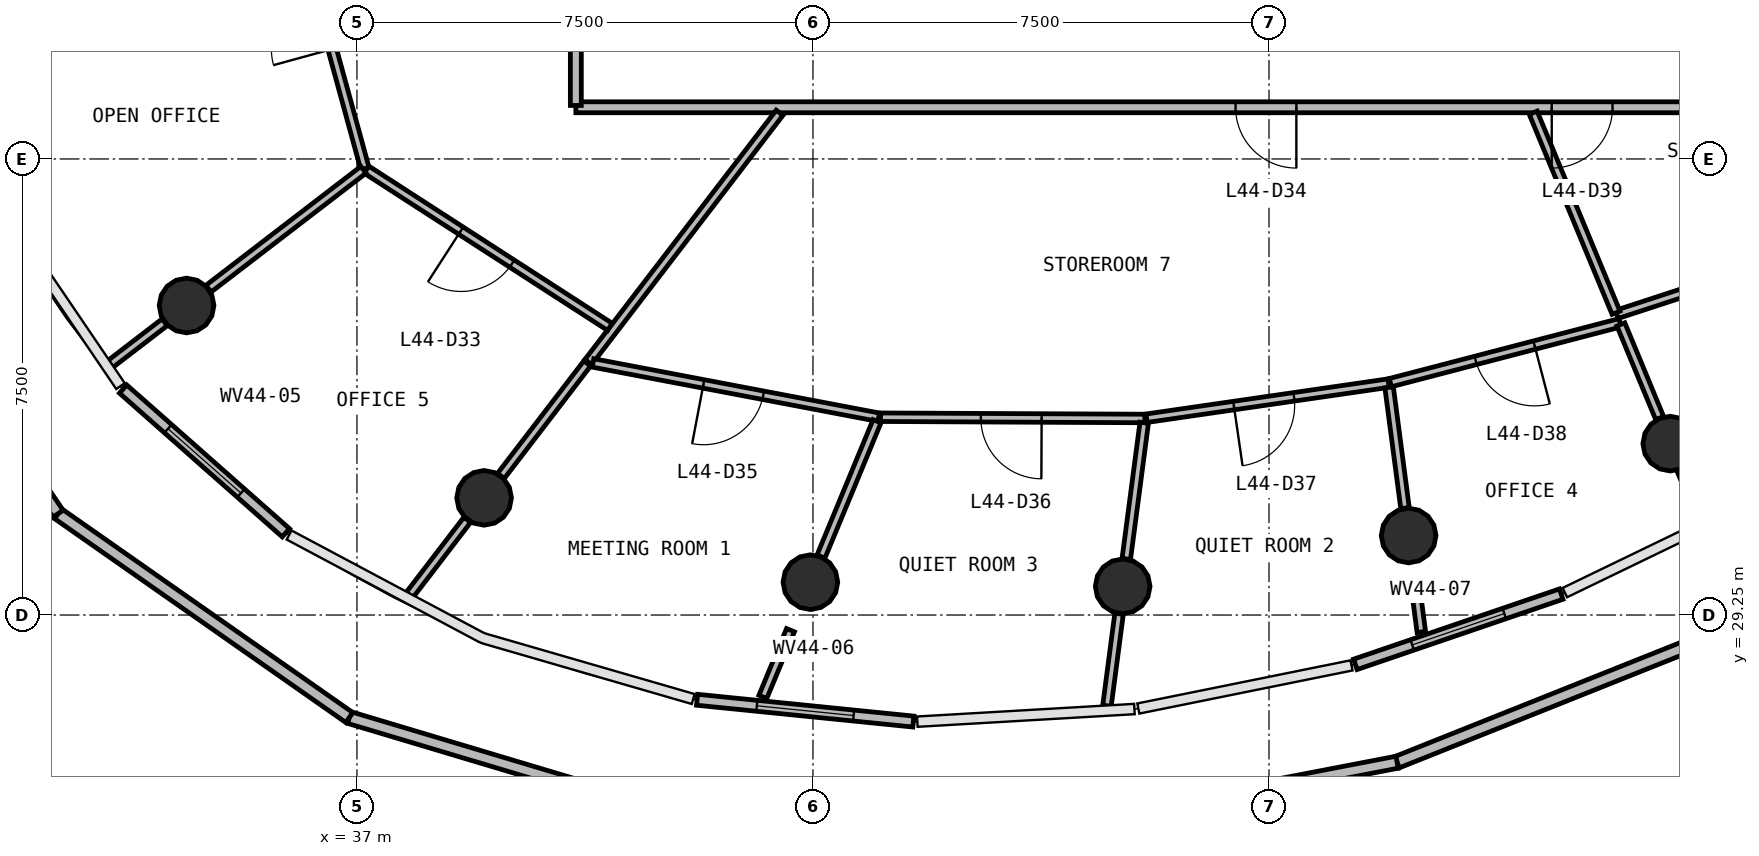
"""IFC4 building model, lengths in metres.
Left out: names, types, materials, properties, quantities, classifications, styles, units other than length and angle.
Written with IfcOpenShell. Run it as: python <this file> out.ifc"""

import sys

from ifc_helpers import new_model, si_unit, direction, frame, frame_2d, origin, origin_2d, place, context, subcontext, project, spatial, rectangle, circle, extrude, source, transform, mapped, element, fill, save


model = new_model("IFC4")
c1 = context("Model", 3, precision=1e-05, world=origin(), true_north=direction((0.0, 1.0)))
c2 = subcontext(c1, "Body", "Model", "MODEL_VIEW")
j1 = project(units=[si_unit("LENGTHUNIT", "METRE"), si_unit("PLANEANGLEUNIT", "RADIAN")], contexts=[c1])
p1 = place(None, origin())
s1 = spatial("IfcSite", under=j1, at=p1, CompositionType="ELEMENT")
p2 = place(p1, origin())
s2 = spatial("IfcBuilding", under=s1, at=p2, CompositionType="ELEMENT")
p3 = place(p2, frame((0.0, 0.0, 183.8)))
s3 = spatial("IfcBuildingStorey", under=s2, at=p3, CompositionType="ELEMENT", Elevation=183.8)
m1 = source(origin(), c2, "Body", "SweptSolid", [
    extrude(circle(Radius=0.45, at=origin_2d()), origin(), (0.0, 0.0, 1.0), 4.22),
])
for number, where, z_axis, x_axis in (
    (1, (34.198, 34.34, -0.32), (0.0, 0.0, 1.0), (1.0, 0.0, 0.0)),
    (2, (39.091, 31.177, -0.32), (0.0, 0.0, 1.0), (1.0, 0.0, 0.0)),
    (3, (44.457, 29.79, -0.32), (0.0, 0.0, 1.0), (1.0, 0.0, 0.0)),
    (4, (49.594, 29.722, -0.32), (0.0, 0.0, 1.0), (1.0, 0.0, 0.0)),
    (5, (54.296, 30.558, -0.32), (0.0, 0.0, 1.0), (1.0, 0.0, 0.0)),
    (6, (58.599, 32.069, -0.32), (0.0, 0.0, 1.0), (1.0, 0.0, 0.0)),
):
    element("IfcColumn", number, at=place(p3, frame(where, z_axis=z_axis, x_axis=x_axis)), inside=s3, PredefinedType="COLUMN", context=c2, shape_type="MappedRepresentation", body=[
        mapped(m1, transform((0.0, 0.0, 0.0), scale=1.0)),
    ])
p4 = place(p3, frame((33.154, 32.966, 0.0), z_axis=(0.0, 0.0, 1.0), x_axis=(0.749604367719, -0.661886162339, 0.0)))
e7 = element("IfcWall", 7, at=p4, inside=s3, PredefinedType="STANDARD", context=c2, shape_type="SweptSolid", body=[
    extrude(rectangle(XDim=3.571, YDim=0.18, at=frame_2d((1.785, 0.0))), origin(), (0.0, 0.0, 1.0), 3.58),
])
p5 = place(p4, frame((0.985, 0.0, 0.9)))
e8 = element("IfcOpeningElement", 8, at=p5, cuts=e7, PredefinedType="OPENING", context=c2, shape_type="SweptSolid", body=[
    extrude(rectangle(XDim=1.6, YDim=2.0, at=frame_2d((0.8, 1.0))), frame((0.0, 0.1, 0.0), z_axis=(0.0, -1.0, 0.0), x_axis=(1.0, 0.0, 0.0)), (0.0, 0.0, 1.0), 0.2),
])
p6 = place(p3, frame((42.594, 27.856, 0.0), z_axis=(0.0, 0.0, 1.0), x_axis=(0.994957099306, -0.100301398496, 0.0)))
e9 = element("IfcWall", 9, at=p6, inside=s3, PredefinedType="STANDARD", context=c2, shape_type="SweptSolid", body=[
    extrude(rectangle(XDim=3.576, YDim=0.18, at=frame_2d((1.788, 0.0))), origin(), (0.0, 0.0, 1.0), 3.58),
])
p7 = place(p6, frame((0.988, 0.0, 0.9)))
e10 = element("IfcOpeningElement", 10, at=p7, cuts=e9, PredefinedType="OPENING", context=c2, shape_type="SweptSolid", body=[
    extrude(rectangle(XDim=1.6, YDim=2.0, at=frame_2d((0.8, 1.0))), frame((0.0, 0.1, 0.0), z_axis=(0.0, -1.0, 0.0), x_axis=(1.0, 0.0, 0.0)), (0.0, 0.0, 1.0), 0.2),
])
p8 = place(p3, frame((53.42, 28.439, 0.0), z_axis=(0.0, 0.0, 1.0), x_axis=(0.946413978014, 0.322956006632, 0.0)))
e11 = element("IfcWall", 11, at=p8, inside=s3, PredefinedType="STANDARD", context=c2, shape_type="SweptSolid", body=[
    extrude(rectangle(XDim=3.577, YDim=0.18, at=frame_2d((1.789, 0.0))), origin(), (0.0, 0.0, 1.0), 3.58),
])
p9 = place(p8, frame((0.989, 0.0, 0.9)))
e12 = element("IfcOpeningElement", 12, at=p9, cuts=e11, PredefinedType="OPENING", context=c2, shape_type="SweptSolid", body=[
    extrude(rectangle(XDim=1.6, YDim=2.0, at=frame_2d((0.8, 1.0))), frame((0.0, 0.1, 0.0), z_axis=(0.0, -1.0, 0.0), x_axis=(1.0, 0.0, 0.0)), (0.0, 0.0, 1.0), 0.2),
])
p10 = place(p3, frame((59.556, 29.005, 0.0), z_axis=(0.0, 0.0, 1.0), x_axis=(-0.928728959039, -0.370759383755, 0.0)))
e13 = element("IfcWall", 13, at=p10, inside=s3, PredefinedType="PARAPET", context=c2, shape_type="SweptSolid", body=[
    extrude(rectangle(XDim=5.868, YDim=0.2, at=frame_2d((2.934, 0.0))), origin(), (0.0, 0.0, 1.0), 1.1),
])
p11 = place(p3, frame((54.106, 26.829, 0.0), z_axis=(0.0, 0.0, 1.0), x_axis=(-0.981997837931, -0.188892155205, 0.0)))
e14 = element("IfcWall", 14, at=p11, inside=s3, PredefinedType="PARAPET", context=c2, shape_type="SweptSolid", body=[
    extrude(rectangle(XDim=5.867, YDim=0.2, at=frame_2d((2.933, 0.0))), origin(), (0.0, 0.0, 1.0), 1.1),
])
p12 = place(p3, frame((42.485, 25.886, 0.0), z_axis=(0.0, 0.0, 1.0), x_axis=(-0.958052046342, 0.286594271576, 0.0)))
e15 = element("IfcWall", 15, at=p12, inside=s3, PredefinedType="PARAPET", context=c2, shape_type="SweptSolid", body=[
    extrude(rectangle(XDim=5.856, YDim=0.2, at=frame_2d((2.928, 0.0))), origin(), (0.0, 0.0, 1.0), 1.1),
])
p13 = place(p3, frame((36.875, 27.564, 0.0), z_axis=(0.0, 0.0, 1.0), x_axis=(-0.819257423142, 0.573425910321, 0.0)))
e16 = element("IfcWall", 16, at=p13, inside=s3, PredefinedType="PARAPET", context=c2, shape_type="SweptSolid", body=[
    extrude(rectangle(XDim=5.846, YDim=0.2, at=frame_2d((2.923, 0.0))), origin(), (0.0, 0.0, 1.0), 1.1),
])
p14 = place(p3, frame((32.085, 30.917, 0.0), z_axis=(0.0, 0.0, 1.0), x_axis=(-0.559388155202, 0.828905840141, 0.0)))
e17 = element("IfcWall", 17, at=p14, inside=s3, PredefinedType="PARAPET", context=c2, shape_type="SweptSolid", body=[
    extrude(rectangle(XDim=5.842, YDim=0.2, at=frame_2d((2.921, 0.0))), origin(), (0.0, 0.0, 1.0), 1.1),
])
p15 = place(p3, frame((63.4, 37.6, 0.0), z_axis=(0.0, 0.0, 1.0), x_axis=(-1.0, 0.0, 0.0)))
e18 = element("IfcWall", 18, at=p15, inside=s3, PredefinedType="PARTITIONING", context=c2, shape_type="SweptSolid", body=[
    extrude(rectangle(XDim=22.8, YDim=0.18, at=frame_2d((11.4, 0.0))), origin(), (0.0, 0.0, 1.0), 2.88),
])
p16 = place(p15, frame((10.95, 0.0, 0.0)))
e19 = element("IfcOpeningElement", 19, at=p16, cuts=e18, PredefinedType="OPENING", context=c2, shape_type="SweptSolid", body=[
    extrude(rectangle(XDim=1.0, YDim=2.1, at=frame_2d((0.5, 1.05))), frame((0.0, 0.1, 0.0), z_axis=(0.0, -1.0, 0.0), x_axis=(1.0, 0.0, 0.0)), (0.0, 0.0, 1.0), 0.2),
])
p17 = place(p15, frame((5.75, 0.0, 0.0)))
e20 = element("IfcOpeningElement", 20, at=p17, cuts=e18, PredefinedType="OPENING", context=c2, shape_type="SweptSolid", body=[
    extrude(rectangle(XDim=1.0, YDim=2.1, at=frame_2d((0.5, 1.05))), frame((0.0, 0.1, 0.0), z_axis=(0.0, -1.0, 0.0), x_axis=(1.0, 0.0, 0.0)), (0.0, 0.0, 1.0), 0.2),
])
p18 = place(p3, frame((40.6, 37.63, 0.0), z_axis=(0.0, 0.0, 1.0), x_axis=(0.0, 1.0, 0.0)))
e21 = element("IfcWall", 21, at=p18, inside=s3, PredefinedType="PARTITIONING", context=c2, shape_type="SweptSolid", body=[
    extrude(rectangle(XDim=20.74, YDim=0.18, at=frame_2d((10.37, 0.0))), origin(), (0.0, 0.0, 1.0), 2.88),
])
p19 = place(p18, frame((12.09, 0.0, 0.0)))
e22 = element("IfcOpeningElement", 22, at=p19, cuts=e21, PredefinedType="OPENING", context=c2, shape_type="SweptSolid", body=[
    extrude(rectangle(XDim=1.0, YDim=2.1, at=frame_2d((0.5, 1.05))), frame((0.0, 0.1, 0.0), z_axis=(0.0, -1.0, 0.0), x_axis=(1.0, 0.0, 0.0)), (0.0, 0.0, 1.0), 0.2),
])
p20 = place(p18, frame((9.89, 0.0, 0.0)))
e23 = element("IfcOpeningElement", 23, at=p20, cuts=e21, PredefinedType="OPENING", context=c2, shape_type="SweptSolid", body=[
    extrude(rectangle(XDim=1.0, YDim=2.1, at=frame_2d((0.5, 1.05))), frame((0.0, 0.1, 0.0), z_axis=(0.0, -1.0, 0.0), x_axis=(1.0, 0.0, 0.0)), (0.0, 0.0, 1.0), 0.2),
])
p21 = place(p3, frame((43.951, 37.51, 0.0), z_axis=(0.0, 0.0, 1.0), x_axis=(-0.608755854273, -0.793357617905, 0.0)))
e24 = element("IfcWall", 24, at=p21, inside=s3, PredefinedType="PARTITIONING", context=c2, shape_type="SweptSolid", body=[
    extrude(rectangle(XDim=5.167, YDim=0.14, at=frame_2d((2.583, 0.0))), origin(), (0.0, 0.0, 1.0), 2.88),
])
p22 = place(p3, frame((37.131, 36.591, 0.0), z_axis=(0.0, 0.0, 1.0), x_axis=(-0.264211604104, 0.964464736658, 0.0)))
e25 = element("IfcWall", 25, at=p22, inside=s3, PredefinedType="PARTITIONING", context=c2, shape_type="SweptSolid", body=[
    extrude(rectangle(XDim=4.889, YDim=0.14, at=frame_2d((2.445, 0.0))), origin(), (0.0, 0.0, 1.0), 2.88),
])
p23 = place(p22, frame((2.039, 0.0, 0.0)))
e26 = element("IfcOpeningElement", 26, at=p23, cuts=e25, PredefinedType="OPENING", context=c2, shape_type="SweptSolid", body=[
    extrude(rectangle(XDim=1.0, YDim=2.1, at=frame_2d((0.5, 1.05))), frame((0.0, 0.08, 0.0), z_axis=(0.0, -1.0, 0.0), x_axis=(1.0, 0.0, 0.0)), (0.0, 0.0, 1.0), 0.16),
])
p24 = place(p3, frame((41.16, 33.989, 0.0), z_axis=(0.0, 0.0, 1.0), x_axis=(-0.840031596416, 0.542537479832, 0.0)))
e27 = element("IfcWall", 27, at=p24, inside=s3, PredefinedType="PARTITIONING", context=c2, shape_type="SweptSolid", body=[
    extrude(rectangle(XDim=4.766, YDim=0.14, at=frame_2d((2.383, 0.0))), origin(), (0.0, 0.0, 1.0), 2.88),
])
p25 = place(p24, frame((1.917, 0.0, 0.0)))
e28 = element("IfcOpeningElement", 28, at=p25, cuts=e27, PredefinedType="OPENING", context=c2, shape_type="SweptSolid", body=[
    extrude(rectangle(XDim=1.0, YDim=2.1, at=frame_2d((0.5, 1.05))), frame((0.0, 0.08, 0.0), z_axis=(0.0, -1.0, 0.0), x_axis=(1.0, 0.0, 0.0)), (0.0, 0.0, 1.0), 0.16),
])
p26 = place(p3, frame((45.581, 32.503, 0.0), z_axis=(0.0, 0.0, 1.0), x_axis=(-0.982412655338, 0.186722721253, 0.0)))
e29 = element("IfcWall", 29, at=p26, inside=s3, PredefinedType="PARTITIONING", context=c2, shape_type="SweptSolid", body=[
    extrude(rectangle(XDim=4.783, YDim=0.14, at=frame_2d((2.392, 0.0))), origin(), (0.0, 0.0, 1.0), 2.88),
])
p27 = place(p26, frame((1.933, 0.0, 0.0)))
e30 = element("IfcOpeningElement", 30, at=p27, cuts=e29, PredefinedType="OPENING", context=c2, shape_type="SweptSolid", body=[
    extrude(rectangle(XDim=1.0, YDim=2.1, at=frame_2d((0.5, 1.05))), frame((0.0, 0.08, 0.0), z_axis=(0.0, -1.0, 0.0), x_axis=(1.0, 0.0, 0.0)), (0.0, 0.0, 1.0), 0.16),
])
p28 = place(p3, frame((49.957, 32.482, 0.0), z_axis=(0.0, 0.0, 1.0), x_axis=(-0.99998886773, 0.004718518419, 0.0)))
e31 = element("IfcWall", 31, at=p28, inside=s3, PredefinedType="PARTITIONING", context=c2, shape_type="SweptSolid", body=[
    extrude(rectangle(XDim=4.346, YDim=0.14, at=frame_2d((2.173, 0.0))), origin(), (0.0, 0.0, 1.0), 2.88),
])
p29 = place(p28, frame((1.696, 0.0, 0.0)))
e32 = element("IfcOpeningElement", 32, at=p29, cuts=e31, PredefinedType="OPENING", context=c2, shape_type="SweptSolid", body=[
    extrude(rectangle(XDim=1.0, YDim=2.1, at=frame_2d((0.5, 1.05))), frame((0.0, 0.08, 0.0), z_axis=(0.0, -1.0, 0.0), x_axis=(1.0, 0.0, 0.0)), (0.0, 0.0, 1.0), 0.16),
])
p30 = place(p3, frame((61.589, 35.457, 0.0), z_axis=(0.0, 0.0, 1.0), x_axis=(-0.950567170275, -0.310519008749, 0.0)))
e33 = element("IfcWall", 33, at=p30, inside=s3, PredefinedType="PARTITIONING", context=c2, shape_type="SweptSolid", body=[
    extrude(rectangle(XDim=4.071, YDim=0.14, at=frame_2d((2.036, 0.0))), origin(), (0.0, 0.0, 1.0), 2.88),
])
p31 = place(p30, frame((1.621, 0.0, 0.0)))
e34 = element("IfcOpeningElement", 34, at=p31, cuts=e33, PredefinedType="OPENING", context=c2, shape_type="SweptSolid", body=[
    extrude(rectangle(XDim=1.0, YDim=2.1, at=frame_2d((0.5, 1.05))), frame((0.0, 0.08, 0.0), z_axis=(0.0, -1.0, 0.0), x_axis=(1.0, 0.0, 0.0)), (0.0, 0.0, 1.0), 0.16),
])
p32 = place(p3, frame((53.966, 33.064, 0.0), z_axis=(0.0, 0.0, 1.0), x_axis=(-0.989628850434, -0.143647966879, 0.0)))
e35 = element("IfcWall", 35, at=p32, inside=s3, PredefinedType="PARTITIONING", context=c2, shape_type="SweptSolid", body=[
    extrude(rectangle(XDim=4.021, YDim=0.14, at=frame_2d((2.011, 0.0))), origin(), (0.0, 0.0, 1.0), 2.88),
])
p33 = place(p32, frame((1.571, 0.0, 0.0)))
e36 = element("IfcOpeningElement", 36, at=p33, cuts=e35, PredefinedType="OPENING", context=c2, shape_type="SweptSolid", body=[
    extrude(rectangle(XDim=1.0, YDim=2.1, at=frame_2d((0.5, 1.05))), frame((0.0, 0.08, 0.0), z_axis=(0.0, -1.0, 0.0), x_axis=(1.0, 0.0, 0.0)), (0.0, 0.0, 1.0), 0.16),
])
p34 = place(p3, frame((57.775, 34.057, 0.0), z_axis=(0.0, 0.0, 1.0), x_axis=(-0.96764845844, -0.252302320398, 0.0)))
e37 = element("IfcWall", 37, at=p34, inside=s3, PredefinedType="PARTITIONING", context=c2, shape_type="SweptSolid", body=[
    extrude(rectangle(XDim=3.906, YDim=0.14, at=frame_2d((1.953, 0.0))), origin(), (0.0, 0.0, 1.0), 2.88),
])
p35 = place(p34, frame((1.456, 0.0, 0.0)))
e38 = element("IfcOpeningElement", 38, at=p35, cuts=e37, PredefinedType="OPENING", context=c2, shape_type="SweptSolid", body=[
    extrude(rectangle(XDim=1.0, YDim=2.1, at=frame_2d((0.5, 1.05))), frame((0.0, 0.08, 0.0), z_axis=(0.0, -1.0, 0.0), x_axis=(1.0, 0.0, 0.0)), (0.0, 0.0, 1.0), 0.16),
])
p36 = place(p3, frame((56.345, 37.51, 0.0), z_axis=(0.0, 0.0, 1.0), x_axis=(0.382666743194, -0.923886445216, 0.0)))
e39 = element("IfcWall", 39, at=p36, inside=s3, PredefinedType="PARTITIONING", context=c2, shape_type="SweptSolid", body=[
    extrude(rectangle(XDim=3.56, YDim=0.14, at=frame_2d((1.78, 0.0))), origin(), (0.0, 0.0, 1.0), 2.88),
])
p37 = place(p3, frame((37.107, 36.573, 0.0), z_axis=(0.0, 0.0, 1.0), x_axis=(-0.79334944096, -0.608766510683, 0.0)))
e40 = element("IfcWall", 40, at=p37, inside=s3, PredefinedType="PARTITIONING", context=c2, shape_type="SweptSolid", body=[
    extrude(rectangle(XDim=3.213, YDim=0.14, at=frame_2d((1.606, 0.0))), origin(), (0.0, 0.0, 1.0), 2.88),
])
p38 = place(p3, frame((40.787, 33.387, 0.0), z_axis=(0.0, 0.0, 1.0), x_axis=(-0.608778925589, -0.793339914386, 0.0)))
e41 = element("IfcWall", 41, at=p38, inside=s3, PredefinedType="PARTITIONING", context=c2, shape_type="SweptSolid", body=[
    extrude(rectangle(XDim=2.331, YDim=0.14, at=frame_2d((1.166, 0.0))), origin(), (0.0, 0.0, 1.0), 2.88),
])
p39 = place(p3, frame((45.553, 32.437, 0.0), z_axis=(0.0, 0.0, 1.0), x_axis=(-0.38266497151, -0.923887179032, 0.0)))
e42 = element("IfcWall", 42, at=p39, inside=s3, PredefinedType="PARTITIONING", context=c2, shape_type="SweptSolid", body=[
    extrude(rectangle(XDim=2.41, YDim=0.14, at=frame_2d((1.205, 0.0))), origin(), (0.0, 0.0, 1.0), 2.88),
])
p40 = place(p3, frame((49.948, 32.412, 0.0), z_axis=(0.0, 0.0, 1.0), x_axis=(-0.130549561333, -0.991441784492, 0.0)))
e43 = element("IfcWall", 43, at=p40, inside=s3, PredefinedType="PARTITIONING", context=c2, shape_type="SweptSolid", body=[
    extrude(rectangle(XDim=2.259, YDim=0.14, at=frame_2d((1.129, 0.0))), origin(), (0.0, 0.0, 1.0), 2.88),
])
p41 = place(p3, frame((53.976, 32.994, 0.0), z_axis=(0.0, 0.0, 1.0), x_axis=(0.13051125281, -0.99144682807, 0.0)))
e44 = element("IfcWall", 44, at=p41, inside=s3, PredefinedType="PARTITIONING", context=c2, shape_type="SweptSolid", body=[
    extrude(rectangle(XDim=2.003, YDim=0.14, at=frame_2d((1.002, 0.0))), origin(), (0.0, 0.0, 1.0), 2.88),
])
p42 = place(p3, frame((57.787, 34.029, 0.0), z_axis=(0.0, 0.0, 1.0), x_axis=(0.382649262881, -0.923893685235, 0.0)))
e45 = element("IfcWall", 45, at=p42, inside=s3, PredefinedType="PARTITIONING", context=c2, shape_type="SweptSolid", body=[
    extrude(rectangle(XDim=1.667, YDim=0.14, at=frame_2d((0.833, 0.0))), origin(), (0.0, 0.0, 1.0), 2.88),
])
p43 = place(p3, frame((44.13, 29.0, 0.0), z_axis=(0.0, 0.0, 1.0), x_axis=(-0.382715239219, -0.92386635704, 0.0)))
e46 = element("IfcWall", 46, at=p43, inside=s3, PredefinedType="PARTITIONING", context=c2, shape_type="SweptSolid", body=[
    extrude(rectangle(XDim=1.187, YDim=0.14, at=frame_2d((0.593, 0.0))), origin(), (0.0, 0.0, 1.0), 2.88),
])
p44 = place(p3, frame((37.838, 29.543, 0.0), z_axis=(0.0, 0.0, 1.0), x_axis=(0.608680693656, 0.79341528418, 0.0)))
e47 = element("IfcWall", 47, at=p44, inside=s3, PredefinedType="PARTITIONING", context=c2, shape_type="SweptSolid", body=[
    extrude(rectangle(XDim=1.604, YDim=0.14, at=frame_2d((0.802, 0.0))), origin(), (0.0, 0.0, 1.0), 2.88),
])
p45 = place(p3, frame((49.534, 29.271, 0.0), z_axis=(0.0, 0.0, 1.0), x_axis=(-0.130392432869, -0.991462461947, 0.0)))
e48 = element("IfcWall", 48, at=p45, inside=s3, PredefinedType="PARTITIONING", context=c2, shape_type="SweptSolid", body=[
    extrude(rectangle(XDim=1.526, YDim=0.14, at=frame_2d((0.763, 0.0))), origin(), (0.0, 0.0, 1.0), 2.88),
])
p46 = place(p3, frame((54.408, 29.71, 0.0), z_axis=(0.0, 0.0, 1.0), x_axis=(0.13027669696, -0.991477676112, 0.0)))
e49 = element("IfcWall", 49, at=p46, inside=s3, PredefinedType="PARTITIONING", context=c2, shape_type="SweptSolid", body=[
    extrude(rectangle(XDim=0.746, YDim=0.14, at=frame_2d((0.373, 0.0))), origin(), (0.0, 0.0, 1.0), 2.88),
])
p47 = place(p3, frame((33.837, 34.063, 0.0), z_axis=(0.0, 0.0, 1.0), x_axis=(-0.793460027174, -0.608622366725, 0.0)))
e50 = element("IfcWall", 50, at=p47, inside=s3, PredefinedType="PARTITIONING", context=c2, shape_type="SweptSolid", body=[
    extrude(rectangle(XDim=1.128, YDim=0.14, at=frame_2d((0.564, 0.0))), origin(), (0.0, 0.0, 1.0), 2.88),
])
p48 = place(p3, frame((58.773, 31.648, 0.0), z_axis=(0.0, 0.0, 1.0), x_axis=(0.382644588695, -0.92389562113, 0.0)))
e51 = element("IfcWall", 51, at=p48, inside=s3, PredefinedType="PARTITIONING", context=c2, shape_type="SweptSolid", body=[
    extrude(rectangle(XDim=0.933, YDim=0.14, at=frame_2d((0.466, 0.0))), origin(), (0.0, 0.0, 1.0), 2.88),
])
m2 = source(origin(), c2, "Body", "SweptSolid", [
    extrude(rectangle(XDim=1.6, YDim=2.0, at=frame_2d((0.8, 1.0))), frame((0.0, 0.03, 0.0), z_axis=(0.0, -1.0, 0.0), x_axis=(1.0, 0.0, 0.0)), (0.0, 0.0, 1.0), 0.06),
])
p49 = place(p5, origin())
e52 = element("IfcWindow", 52, at=p49, inside=s3, PartitioningType="SINGLE_PANEL", PredefinedType="WINDOW", context=c2, shape_type="MappedRepresentation", body=[
    mapped(m2, transform((0.0, 0.0, 0.0), scale=1.0)),
])
fill(e8, e52)
p50 = place(p7, origin())
e53 = element("IfcWindow", 53, at=p50, inside=s3, PartitioningType="SINGLE_PANEL", PredefinedType="WINDOW", context=c2, shape_type="MappedRepresentation", body=[
    mapped(m2, transform((0.0, 0.0, 0.0), scale=1.0)),
])
fill(e10, e53)
p51 = place(p9, origin())
e54 = element("IfcWindow", 54, at=p51, inside=s3, PartitioningType="SINGLE_PANEL", PredefinedType="WINDOW", context=c2, shape_type="MappedRepresentation", body=[
    mapped(m2, transform((0.0, 0.0, 0.0), scale=1.0)),
])
fill(e12, e54)
m3 = source(origin(), c2, "Body", "SweptSolid", [
    extrude(rectangle(XDim=1.0, YDim=2.1, at=frame_2d((0.5, 1.05))), frame((0.0, 0.025, 0.0), z_axis=(0.0, -1.0, 0.0), x_axis=(1.0, 0.0, 0.0)), (0.0, 0.0, 1.0), 0.05),
])
p52 = place(p25, origin())
e55 = element("IfcDoor", 55, at=p52, inside=s3, OperationType="SINGLE_SWING_RIGHT", PredefinedType="DOOR", context=c2, shape_type="MappedRepresentation", body=[
    mapped(m3, transform((0.0, 0.0, 0.0), scale=1.0)),
])
fill(e28, e55)
p53 = place(p16, origin())
e56 = element("IfcDoor", 56, at=p53, inside=s3, OperationType="SINGLE_SWING_LEFT", PredefinedType="DOOR", context=c2, shape_type="MappedRepresentation", body=[
    mapped(m3, transform((0.0, 0.0, 0.0), scale=1.0)),
])
fill(e19, e56)
p54 = place(p27, origin())
e57 = element("IfcDoor", 57, at=p54, inside=s3, OperationType="SINGLE_SWING_RIGHT", PredefinedType="DOOR", context=c2, shape_type="MappedRepresentation", body=[
    mapped(m3, transform((0.0, 0.0, 0.0), scale=1.0)),
])
fill(e30, e57)
p55 = place(p29, origin())
e58 = element("IfcDoor", 58, at=p55, inside=s3, OperationType="SINGLE_SWING_LEFT", PredefinedType="DOOR", context=c2, shape_type="MappedRepresentation", body=[
    mapped(m3, transform((0.0, 0.0, 0.0), scale=1.0)),
])
fill(e32, e58)
p56 = place(p33, origin())
e59 = element("IfcDoor", 59, at=p56, inside=s3, OperationType="SINGLE_SWING_RIGHT", PredefinedType="DOOR", context=c2, shape_type="MappedRepresentation", body=[
    mapped(m3, transform((0.0, 0.0, 0.0), scale=1.0)),
])
fill(e36, e59)
p57 = place(p35, origin())
e60 = element("IfcDoor", 60, at=p57, inside=s3, OperationType="SINGLE_SWING_LEFT", PredefinedType="DOOR", context=c2, shape_type="MappedRepresentation", body=[
    mapped(m3, transform((0.0, 0.0, 0.0), scale=1.0)),
])
fill(e38, e60)
p58 = place(p17, origin())
e61 = element("IfcDoor", 61, at=p58, inside=s3, OperationType="SINGLE_SWING_RIGHT", PredefinedType="DOOR", context=c2, shape_type="MappedRepresentation", body=[
    mapped(m3, transform((0.0, 0.0, 0.0), scale=1.0)),
])
fill(e20, e61)
save(model, sys.argv[1])
